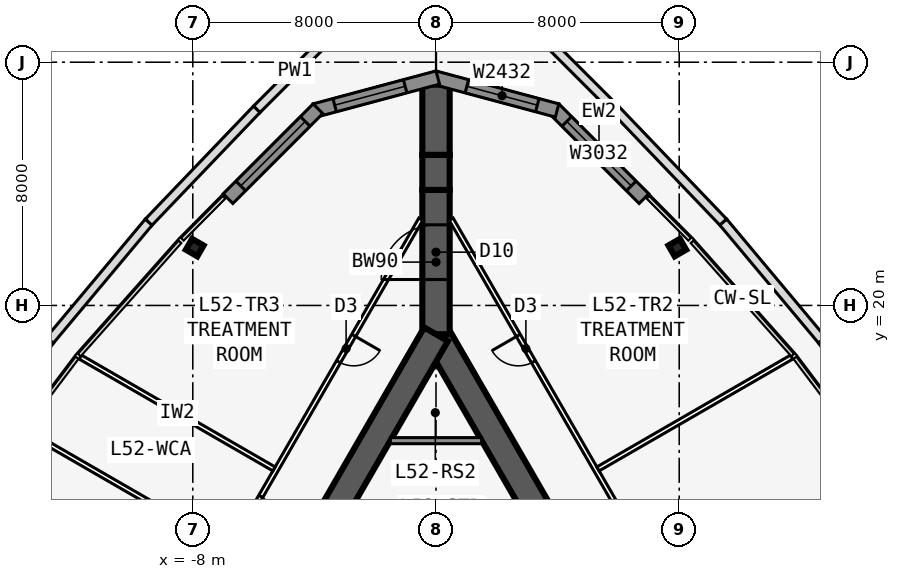
"""IFC4 building model, lengths in metres.
Left out: names, types, materials, properties, quantities, classifications, styles, units other than length and angle.
Written with IfcOpenShell. Run it as: python <this file> out.ifc"""

import sys

from ifc_helpers import new_model, si_unit, direction, frame, frame_2d, origin, origin_2d, place, context, subcontext, project, spatial, polyline, rectangle, i_section, outline, extrude, element, fill, save


model = new_model("IFC4")
c1 = context("Model", 3, precision=1e-05, world=origin(), true_north=direction((0.0, 1.0)))
c2 = subcontext(c1, "Body", "Model", "MODEL_VIEW")
j1 = project(units=[si_unit("LENGTHUNIT", "METRE"), si_unit("PLANEANGLEUNIT", "RADIAN")], contexts=[c1])
p1 = place(None, origin())
s1 = spatial("IfcSite", under=j1, at=p1, CompositionType="ELEMENT")
p2 = place(p1, origin())
s2 = spatial("IfcBuilding", under=s1, at=p2, CompositionType="ELEMENT")
p3 = place(p2, frame((0.0, 0.0, 195.9)))
s3 = spatial("IfcBuildingStorey", under=s2, at=p3, CompositionType="ELEMENT", Elevation=195.9)
p4 = place(p3, frame((16.5, -9.526, 0.0), z_axis=(0.0, 0.0, 1.0), x_axis=(-0.499999749417, 0.866025548458, 0.0)))
e1 = element("IfcWall", 1, at=p4, inside=s3, PredefinedType="SHEAR", context=c2, shape_type="SweptSolid", body=[
    extrude(rectangle(XDim=33.0, YDim=0.9, at=frame_2d((16.5, 0.0))), origin(), (0.0, 0.0, 1.0), 5.0),
])
p5 = place(p4, frame((14.15, 0.0, 0.0)))
e2 = element("IfcOpeningElement", 2, at=p5, cuts=e1, PredefinedType="OPENING", context=c2, shape_type="SweptSolid", body=[
    extrude(rectangle(XDim=1.8, YDim=2.13, at=frame_2d((0.9, 1.065))), frame((0.0, 0.46, 0.0), z_axis=(0.0, -1.0, 0.0), x_axis=(1.0, 0.0, 0.0)), (0.0, 0.0, 1.0), 0.92),
])
p6 = place(p4, frame((12.6, 0.0, 0.0)))
e3 = element("IfcOpeningElement", 3, at=p6, cuts=e1, PredefinedType="OPENING", context=c2, shape_type="SweptSolid", body=[
    extrude(rectangle(XDim=1.0, YDim=2.13, at=frame_2d((0.5, 1.065))), frame((0.0, 0.46, 0.0), z_axis=(0.0, -1.0, 0.0), x_axis=(1.0, 0.0, 0.0)), (0.0, 0.0, 1.0), 0.92),
])
p7 = place(p3, frame((0.0, 19.052, 0.0), z_axis=(0.0, 0.0, 1.0), x_axis=(-0.499999749417, -0.866025548458, 0.0)))
e4 = element("IfcWall", 4, at=p7, inside=s3, PredefinedType="SHEAR", context=c2, shape_type="SweptSolid", body=[
    extrude(rectangle(XDim=33.0, YDim=0.9, at=frame_2d((16.5, 0.0))), origin(), (0.0, 0.0, 1.0), 5.0),
])
p8 = place(p7, frame((14.15, 0.0, 0.0)))
e5 = element("IfcOpeningElement", 5, at=p8, cuts=e4, PredefinedType="OPENING", context=c2, shape_type="SweptSolid", body=[
    extrude(rectangle(XDim=1.8, YDim=2.13, at=frame_2d((0.9, 1.065))), frame((0.0, 0.46, 0.0), z_axis=(0.0, -1.0, 0.0), x_axis=(1.0, 0.0, 0.0)), (0.0, 0.0, 1.0), 0.92),
])
p9 = place(p7, frame((12.6, 0.0, 0.0)))
e6 = element("IfcOpeningElement", 6, at=p9, cuts=e4, PredefinedType="OPENING", context=c2, shape_type="SweptSolid", body=[
    extrude(rectangle(XDim=1.0, YDim=2.13, at=frame_2d((0.5, 1.065))), frame((0.0, 0.46, 0.0), z_axis=(0.0, -1.0, 0.0), x_axis=(1.0, 0.0, 0.0)), (0.0, 0.0, 1.0), 0.92),
])
p10 = place(p3, frame((0.0, 19.052, 0.0), z_axis=(0.0, 0.0, 1.0), x_axis=(0.0, 1.0, 0.0)))
e7 = element("IfcWall", 7, at=p10, inside=s3, PredefinedType="SHEAR", context=c2, shape_type="SweptSolid", body=[
    extrude(rectangle(XDim=4.746, YDim=0.9, at=frame_2d((2.373, 0.0))), origin(), (0.0, 0.0, 1.0), 5.0),
])
p11 = place(p10, frame((1.8, 0.0, 0.0)))
e8 = element("IfcOpeningElement", 8, at=p11, cuts=e7, PredefinedType="OPENING", context=c2, shape_type="SweptSolid", body=[
    extrude(rectangle(XDim=1.8, YDim=2.13, at=frame_2d((0.9, 1.065))), frame((0.0, 0.46, 0.0), z_axis=(0.0, -1.0, 0.0), x_axis=(1.0, 0.0, 0.0)), (0.0, 0.0, 1.0), 0.92),
])
p12 = place(p3, frame((0.0, 23.799, 0.0), z_axis=(0.0, 0.0, 1.0), x_axis=(0.0, 1.0, 0.0)))
e9 = element("IfcWall", 9, at=p12, inside=s3, PredefinedType="SHEAR", context=c2, shape_type="SweptSolid", body=[
    extrude(rectangle(XDim=1.155, YDim=0.9, at=frame_2d((0.577, 0.0))), origin(), (0.0, 0.0, 1.0), 5.0),
])
p13 = place(p3, frame((0.0, 24.953, 0.0), z_axis=(0.0, 0.0, 1.0), x_axis=(0.0, 1.0, 0.0)))
e10 = element("IfcWall", 10, at=p13, inside=s3, PredefinedType="SHEAR", context=c2, shape_type="SweptSolid", body=[
    extrude(rectangle(XDim=2.309, YDim=0.9, at=frame_2d((1.155, 0.0))), origin(), (0.0, 0.0, 1.0), 5.0),
])
for number, where, z_axis, x_axis in (
    (11, (7.937, 21.903, 0.0), (0.0, 0.0, 1.0), (-0.5, 0.866, 0.0)),
    (12, (-7.937, 21.903, 0.0), (0.0, 0.0, 1.0), (-0.5, -0.866, 0.0)),
):
    element("IfcColumn", number, at=place(p3, frame(where, z_axis=z_axis, x_axis=x_axis)), inside=s3, PredefinedType="COLUMN", context=c2, shape_type="SweptSolid", body=[
        extrude(i_section(OverallWidth=0.411, OverallDepth=0.434, WebThickness=0.036, FlangeThickness=0.057, at=origin_2d()), origin(), (0.0, 0.0, 1.0), 5.0),
    ])
p14 = place(p3, frame((6.841, 23.512, 0.0), z_axis=(0.0, 0.0, 1.0), x_axis=(-0.707106781187, 0.707106781187, 0.0)))
e13 = element("IfcWall", 13, at=p14, inside=s3, PredefinedType="SOLIDWALL", context=c2, shape_type="SweptSolid", body=[
    extrude(rectangle(XDim=4.184, YDim=0.45, at=frame_2d((2.092, 0.0))), origin(), (0.0, 0.0, 1.0), 4.835),
])
p15 = place(p14, frame((0.592, 0.0, 0.6)))
e14 = element("IfcOpeningElement", 14, at=p15, cuts=e13, PredefinedType="OPENING", context=c2, shape_type="SweptSolid", body=[
    extrude(rectangle(XDim=3.0, YDim=3.2, at=frame_2d((1.5, 1.6))), frame((0.0, 0.235, 0.0), z_axis=(0.0, -1.0, 0.0), x_axis=(1.0, 0.0, 0.0)), (0.0, 0.0, 1.0), 0.47),
])
p16 = place(p3, frame((3.983, 26.413, 0.0), z_axis=(0.0, 0.0, 1.0), x_axis=(-0.965920442324, 0.258839137498, 0.0)))
e15 = element("IfcWall", 15, at=p16, inside=s3, PredefinedType="SOLIDWALL", context=c2, shape_type="SweptSolid", body=[
    extrude(outline(polyline([(4.184, 0.225), (4.124, 0.225), (3.633, 0.093), (3.598, 0.225), (0.0, 0.225), (0.0, -0.225), (4.184, -0.225), (4.184, 0.225)])), origin(), (0.0, 0.0, 1.0), 4.835),
])
p17 = place(p16, frame((0.674, 0.0, 0.6)))
e16 = element("IfcOpeningElement", 16, at=p17, cuts=e15, PredefinedType="OPENING", context=c2, shape_type="SweptSolid", body=[
    extrude(rectangle(XDim=2.4, YDim=3.2, at=frame_2d((1.2, 1.6))), frame((0.0, 0.235, 0.0), z_axis=(0.0, -1.0, 0.0), x_axis=(1.0, 0.0, 0.0)), (0.0, 0.0, 1.0), 0.47),
])
p18 = place(p3, frame((0.058, 27.496, 0.0), z_axis=(0.0, 0.0, 1.0), x_axis=(-0.965920442324, -0.258839137498, 0.0)))
e17 = element("IfcWall", 17, at=p18, inside=s3, PredefinedType="SOLIDWALL", context=c2, shape_type="SweptSolid", body=[
    extrude(outline(polyline([(4.184, 0.225), (0.586, 0.225), (0.551, 0.093), (0.06, 0.225), (0.0, 0.225), (0.0, -0.225), (4.184, -0.225), (4.184, 0.225)])), origin(), (0.0, 0.0, 1.0), 4.835),
])
p19 = place(p18, frame((1.11, 0.0, 0.6)))
e18 = element("IfcOpeningElement", 18, at=p19, cuts=e17, PredefinedType="OPENING", context=c2, shape_type="SweptSolid", body=[
    extrude(rectangle(XDim=2.4, YDim=3.2, at=frame_2d((1.2, 1.6))), frame((0.0, 0.235, 0.0), z_axis=(0.0, -1.0, 0.0), x_axis=(1.0, 0.0, 0.0)), (0.0, 0.0, 1.0), 0.47),
])
p20 = place(p3, frame((-3.882, 26.471, 0.0), z_axis=(0.0, 0.0, 1.0), x_axis=(-0.707106781187, -0.707106781187, 0.0)))
e19 = element("IfcWall", 19, at=p20, inside=s3, PredefinedType="SOLIDWALL", context=c2, shape_type="SweptSolid", body=[
    extrude(rectangle(XDim=4.184, YDim=0.45, at=frame_2d((2.092, 0.0))), origin(), (0.0, 0.0, 1.0), 4.835),
])
p21 = place(p20, frame((0.592, 0.0, 0.6)))
e20 = element("IfcOpeningElement", 20, at=p21, cuts=e19, PredefinedType="OPENING", context=c2, shape_type="SweptSolid", body=[
    extrude(rectangle(XDim=3.0, YDim=3.2, at=frame_2d((1.5, 1.6))), frame((0.0, 0.235, 0.0), z_axis=(0.0, -1.0, 0.0), x_axis=(1.0, 0.0, 0.0)), (0.0, 0.0, 1.0), 0.47),
])
p22 = place(p3, frame((-15.649, 14.796, 0.0), z_axis=(0.0, 0.0, 1.0), x_axis=(0.587682609785, 0.809091558574, 0.0)))
e21 = element("IfcWall", 21, at=p22, inside=s3, PredefinedType="PARAPET", context=c2, shape_type="SweptSolid", body=[
    extrude(rectangle(XDim=5.017, YDim=0.3, at=frame_2d((2.509, 0.0))), origin(), (0.0, 0.0, 1.0), 1.1),
])
p23 = place(p3, frame((-12.7, 18.856, 0.0), z_axis=(0.0, 0.0, 1.0), x_axis=(0.641804200525, 0.766868546876, 0.0)))
e22 = element("IfcWall", 22, at=p23, inside=s3, PredefinedType="PARAPET", context=c2, shape_type="SweptSolid", body=[
    extrude(rectangle(XDim=5.066, YDim=0.3, at=frame_2d((2.533, 0.0))), origin(), (0.0, 0.0, 1.0), 1.1),
])
p24 = place(p3, frame((-9.449, 22.74, 0.0), z_axis=(0.0, 0.0, 1.0), x_axis=(0.691747542748, 0.722139416666, 0.0)))
e23 = element("IfcWall", 23, at=p24, inside=s3, PredefinedType="PARAPET", context=c2, shape_type="SweptSolid", body=[
    extrude(rectangle(XDim=5.141, YDim=0.3, at=frame_2d((2.571, 0.0))), origin(), (0.0, 0.0, 1.0), 1.1),
])
for number, where, z_axis, x_axis in (
    (24, (-5.893, 26.453, 0.0), (0.0, 0.0, 1.0), (0.707, 0.707, 0.0)),
    (25, (3.386, 28.959, 0.0), (0.0, 0.0, 1.0), (0.707, -0.707, 0.0)),
):
    element("IfcWall", number, at=place(p3, frame(where, z_axis=z_axis, x_axis=x_axis)), inside=s3, PredefinedType="PARAPET", context=c2, shape_type="SweptSolid", body=[
        extrude(rectangle(XDim=3.544, YDim=0.3, at=frame_2d((1.772, 0.0))), origin(), (0.0, 0.0, 1.0), 1.1),
    ])
p25 = place(p3, frame((5.893, 26.453, 0.0), z_axis=(0.0, 0.0, 1.0), x_axis=(0.691747542748, -0.722139416666, 0.0)))
e26 = element("IfcWall", 26, at=p25, inside=s3, PredefinedType="PARAPET", context=c2, shape_type="SweptSolid", body=[
    extrude(rectangle(XDim=5.141, YDim=0.3, at=frame_2d((2.571, 0.0))), origin(), (0.0, 0.0, 1.0), 1.1),
])
p26 = place(p3, frame((9.449, 22.74, 0.0), z_axis=(0.0, 0.0, 1.0), x_axis=(0.641804200525, -0.766868546876, 0.0)))
e27 = element("IfcWall", 27, at=p26, inside=s3, PredefinedType="PARAPET", context=c2, shape_type="SweptSolid", body=[
    extrude(rectangle(XDim=5.066, YDim=0.3, at=frame_2d((2.533, 0.0))), origin(), (0.0, 0.0, 1.0), 1.1),
])
p27 = place(p3, frame((12.7, 18.856, 0.0), z_axis=(0.0, 0.0, 1.0), x_axis=(0.587682609785, -0.809091558574, 0.0)))
e28 = element("IfcWall", 28, at=p27, inside=s3, PredefinedType="PARAPET", context=c2, shape_type="SweptSolid", body=[
    extrude(rectangle(XDim=5.017, YDim=0.3, at=frame_2d((2.509, 0.0))), origin(), (0.0, 0.0, 1.0), 1.1),
])
p28 = place(p3, frame((20.027, -10.985, 0.0), z_axis=(0.0, 0.0, 1.0), x_axis=(-0.500001677587, 0.866024435227, 0.0)))
e29 = element("IfcWall", 29, at=p28, inside=s3, PredefinedType="PARTITIONING", context=c2, shape_type="SweptSolid", body=[
    extrude(rectangle(XDim=39.054, YDim=0.15, at=frame_2d((19.527, 0.0))), origin(), (0.0, 0.0, 1.0), 4.835),
])
p29 = place(p28, frame((4.414, 0.0, 0.0)))
e30 = element("IfcOpeningElement", 30, at=p29, cuts=e29, PredefinedType="OPENING", context=c2, shape_type="SweptSolid", body=[
    extrude(rectangle(XDim=1.0, YDim=2.13, at=frame_2d((0.5, 1.065))), frame((0.0, 0.085, 0.0), z_axis=(0.0, -1.0, 0.0), x_axis=(1.0, 0.0, 0.0)), (0.0, 0.0, 1.0), 0.17),
])
p30 = place(p28, frame((14.027, 0.0, 0.0)))
e31 = element("IfcOpeningElement", 31, at=p30, cuts=e29, PredefinedType="OPENING", context=c2, shape_type="SweptSolid", body=[
    extrude(rectangle(XDim=1.0, YDim=2.13, at=frame_2d((0.5, 1.065))), frame((0.0, 0.085, 0.0), z_axis=(0.0, -1.0, 0.0), x_axis=(1.0, 0.0, 0.0)), (0.0, 0.0, 1.0), 0.17),
])
p31 = place(p28, frame((24.027, 0.0, 0.0)))
e32 = element("IfcOpeningElement", 32, at=p31, cuts=e29, PredefinedType="OPENING", context=c2, shape_type="SweptSolid", body=[
    extrude(rectangle(XDim=1.0, YDim=2.13, at=frame_2d((0.5, 1.065))), frame((0.0, 0.085, 0.0), z_axis=(0.0, -1.0, 0.0), x_axis=(1.0, 0.0, 0.0)), (0.0, 0.0, 1.0), 0.17),
])
p32 = place(p28, frame((33.64, 0.0, 0.0)))
e33 = element("IfcOpeningElement", 33, at=p32, cuts=e29, PredefinedType="OPENING", context=c2, shape_type="SweptSolid", body=[
    extrude(rectangle(XDim=1.0, YDim=2.13, at=frame_2d((0.5, 1.065))), frame((0.0, 0.085, 0.0), z_axis=(0.0, -1.0, 0.0), x_axis=(1.0, 0.0, 0.0)), (0.0, 0.0, 1.0), 0.17),
])
p33 = place(p3, frame((5.329, 14.623, 0.0), z_axis=(0.0, 0.0, 1.0), x_axis=(0.866018089937, 0.500012667742, 0.0)))
e34 = element("IfcWall", 34, at=p33, inside=s3, PredefinedType="PARTITIONING", context=c2, shape_type="SweptSolid", body=[
    extrude(rectangle(XDim=7.355, YDim=0.15, at=frame_2d((3.677, 0.0))), origin(), (0.0, 0.0, 1.0), 3.989),
])
p34 = place(p3, frame((-0.5, 22.836, 0.0), z_axis=(0.0, 0.0, 1.0), x_axis=(-0.500001677587, -0.866024435227, 0.0)))
e35 = element("IfcWall", 35, at=p34, inside=s3, PredefinedType="PARTITIONING", context=c2, shape_type="SweptSolid", body=[
    extrude(rectangle(XDim=39.054, YDim=0.15, at=frame_2d((19.527, 0.0))), origin(), (0.0, 0.0, 1.0), 4.835),
])
p35 = place(p34, frame((4.414, 0.0, 0.0)))
e36 = element("IfcOpeningElement", 36, at=p35, cuts=e35, PredefinedType="OPENING", context=c2, shape_type="SweptSolid", body=[
    extrude(rectangle(XDim=1.0, YDim=2.13, at=frame_2d((0.5, 1.065))), frame((0.0, 0.085, 0.0), z_axis=(0.0, -1.0, 0.0), x_axis=(1.0, 0.0, 0.0)), (0.0, 0.0, 1.0), 0.17),
])
p36 = place(p34, frame((10.527, 0.0, 0.0)))
e37 = element("IfcOpeningElement", 37, at=p36, cuts=e35, PredefinedType="OPENING", context=c2, shape_type="SweptSolid", body=[
    extrude(rectangle(XDim=1.0, YDim=2.13, at=frame_2d((0.5, 1.065))), frame((0.0, 0.085, 0.0), z_axis=(0.0, -1.0, 0.0), x_axis=(1.0, 0.0, 0.0)), (0.0, 0.0, 1.0), 0.17),
])
p37 = place(p34, frame((15.527, 0.0, 0.0)))
e38 = element("IfcOpeningElement", 38, at=p37, cuts=e35, PredefinedType="OPENING", context=c2, shape_type="SweptSolid", body=[
    extrude(rectangle(XDim=1.0, YDim=2.13, at=frame_2d((0.5, 1.065))), frame((0.0, 0.085, 0.0), z_axis=(0.0, -1.0, 0.0), x_axis=(1.0, 0.0, 0.0)), (0.0, 0.0, 1.0), 0.17),
])
p38 = place(p34, frame((24.027, 0.0, 0.0)))
e39 = element("IfcOpeningElement", 39, at=p38, cuts=e35, PredefinedType="OPENING", context=c2, shape_type="SweptSolid", body=[
    extrude(rectangle(XDim=1.0, YDim=2.13, at=frame_2d((0.5, 1.065))), frame((0.0, 0.085, 0.0), z_axis=(0.0, -1.0, 0.0), x_axis=(1.0, 0.0, 0.0)), (0.0, 0.0, 1.0), 0.17),
])
p39 = place(p34, frame((33.64, 0.0, 0.0)))
e40 = element("IfcOpeningElement", 40, at=p39, cuts=e35, PredefinedType="OPENING", context=c2, shape_type="SweptSolid", body=[
    extrude(rectangle(XDim=1.0, YDim=2.13, at=frame_2d((0.5, 1.065))), frame((0.0, 0.085, 0.0), z_axis=(0.0, -1.0, 0.0), x_axis=(1.0, 0.0, 0.0)), (0.0, 0.0, 1.0), 0.17),
])
p40 = place(p3, frame((-5.329, 14.623, 0.0), z_axis=(0.0, 0.0, 1.0), x_axis=(-0.866018089937, 0.500012667742, 0.0)))
e41 = element("IfcWall", 41, at=p40, inside=s3, PredefinedType="PARTITIONING", context=c2, shape_type="SweptSolid", body=[
    extrude(rectangle(XDim=7.355, YDim=0.15, at=frame_2d((3.677, 0.0))), origin(), (0.0, 0.0, 1.0), 3.989),
])
p41 = place(p3, frame((-6.829, 12.025, 0.0), z_axis=(0.0, 0.0, 1.0), x_axis=(-0.866029684289, 0.499992585876, 0.0)))
e42 = element("IfcWall", 42, at=p41, inside=s3, PredefinedType="PARTITIONING", context=c2, shape_type="SweptSolid", body=[
    extrude(rectangle(XDim=7.693, YDim=0.15, at=frame_2d((3.846, 0.0))), origin(), (0.0, 0.0, 1.0), 4.835),
])
p42 = place(p3, frame((-1.501, 15.552, 0.0), z_axis=(0.0, 0.0, 1.0), x_axis=(1.0, 0.0, 0.0)))
e43 = element("IfcWall", 43, at=p42, inside=s3, PredefinedType="SOLIDWALL", context=c2, shape_type="SweptSolid", body=[
    extrude(rectangle(XDim=3.002, YDim=0.2, at=frame_2d((1.501, 0.0))), origin(), (0.0, 0.0, 1.0), 4.835),
])
p43 = place(p15, origin())
e44 = element("IfcWindow", 44, at=p43, inside=s3, PartitioningType="SINGLE_PANEL", PredefinedType="WINDOW", context=c2, shape_type="SweptSolid", body=[
    extrude(rectangle(XDim=3.0, YDim=3.2, at=frame_2d((1.5, 1.6))), frame((0.0, 0.03, 0.0), z_axis=(0.0, -1.0, 0.0), x_axis=(1.0, 0.0, 0.0)), (0.0, 0.0, 1.0), 0.06),
])
fill(e14, e44)
p44 = place(p17, origin())
e45 = element("IfcWindow", 45, at=p44, inside=s3, PartitioningType="SINGLE_PANEL", PredefinedType="WINDOW", context=c2, shape_type="SweptSolid", body=[
    extrude(rectangle(XDim=2.4, YDim=3.2, at=frame_2d((1.2, 1.6))), frame((0.0, 0.03, 0.0), z_axis=(0.0, -1.0, 0.0), x_axis=(1.0, 0.0, 0.0)), (0.0, 0.0, 1.0), 0.06),
])
fill(e16, e45)
p45 = place(p19, origin())
e46 = element("IfcWindow", 46, at=p45, inside=s3, PartitioningType="SINGLE_PANEL", PredefinedType="WINDOW", context=c2, shape_type="SweptSolid", body=[
    extrude(rectangle(XDim=2.4, YDim=3.2, at=frame_2d((1.2, 1.6))), frame((0.0, 0.03, 0.0), z_axis=(0.0, -1.0, 0.0), x_axis=(1.0, 0.0, 0.0)), (0.0, 0.0, 1.0), 0.06),
])
fill(e18, e46)
p46 = place(p21, origin())
e47 = element("IfcWindow", 47, at=p46, inside=s3, PartitioningType="SINGLE_PANEL", PredefinedType="WINDOW", context=c2, shape_type="SweptSolid", body=[
    extrude(rectangle(XDim=3.0, YDim=3.2, at=frame_2d((1.5, 1.6))), frame((0.0, 0.03, 0.0), z_axis=(0.0, -1.0, 0.0), x_axis=(1.0, 0.0, 0.0)), (0.0, 0.0, 1.0), 0.06),
])
fill(e20, e47)
p47 = place(p32, origin())
e48 = element("IfcDoor", 48, at=p47, inside=s3, OperationType="SINGLE_SWING_RIGHT", PredefinedType="DOOR", context=c2, shape_type="SweptSolid", body=[
    extrude(rectangle(XDim=1.0, YDim=2.13, at=frame_2d((0.5, 1.065))), frame((0.0, 0.025, 0.0), z_axis=(0.0, -1.0, 0.0), x_axis=(1.0, 0.0, 0.0)), (0.0, 0.0, 1.0), 0.05),
])
fill(e33, e48)
p48 = place(p35, origin())
e49 = element("IfcDoor", 49, at=p48, inside=s3, OperationType="SINGLE_SWING_LEFT", PredefinedType="DOOR", context=c2, shape_type="SweptSolid", body=[
    extrude(rectangle(XDim=1.0, YDim=2.13, at=frame_2d((0.5, 1.065))), frame((0.0, 0.025, 0.0), z_axis=(0.0, -1.0, 0.0), x_axis=(1.0, 0.0, 0.0)), (0.0, 0.0, 1.0), 0.05),
])
fill(e36, e49)
p49 = place(p36, origin())
e50 = element("IfcDoor", 50, at=p49, inside=s3, OperationType="SINGLE_SWING_RIGHT", PredefinedType="DOOR", context=c2, shape_type="SweptSolid", body=[
    extrude(rectangle(XDim=1.0, YDim=2.13, at=frame_2d((0.5, 1.065))), frame((0.0, 0.025, 0.0), z_axis=(0.0, -1.0, 0.0), x_axis=(1.0, 0.0, 0.0)), (0.0, 0.0, 1.0), 0.05),
])
fill(e37, e50)
p50 = place(p11, origin())
e51 = element("IfcDoor", 51, at=p50, inside=s3, OperationType="DOUBLE_DOOR_DOUBLE_SWING", PredefinedType="DOOR", context=c2, shape_type="SweptSolid", body=[
    extrude(rectangle(XDim=1.8, YDim=2.13, at=frame_2d((0.9, 1.065))), frame((0.0, 0.025, 0.0), z_axis=(0.0, -1.0, 0.0), x_axis=(1.0, 0.0, 0.0)), (0.0, 0.0, 1.0), 0.05),
])
fill(e8, e51)
save(model, sys.argv[1])
